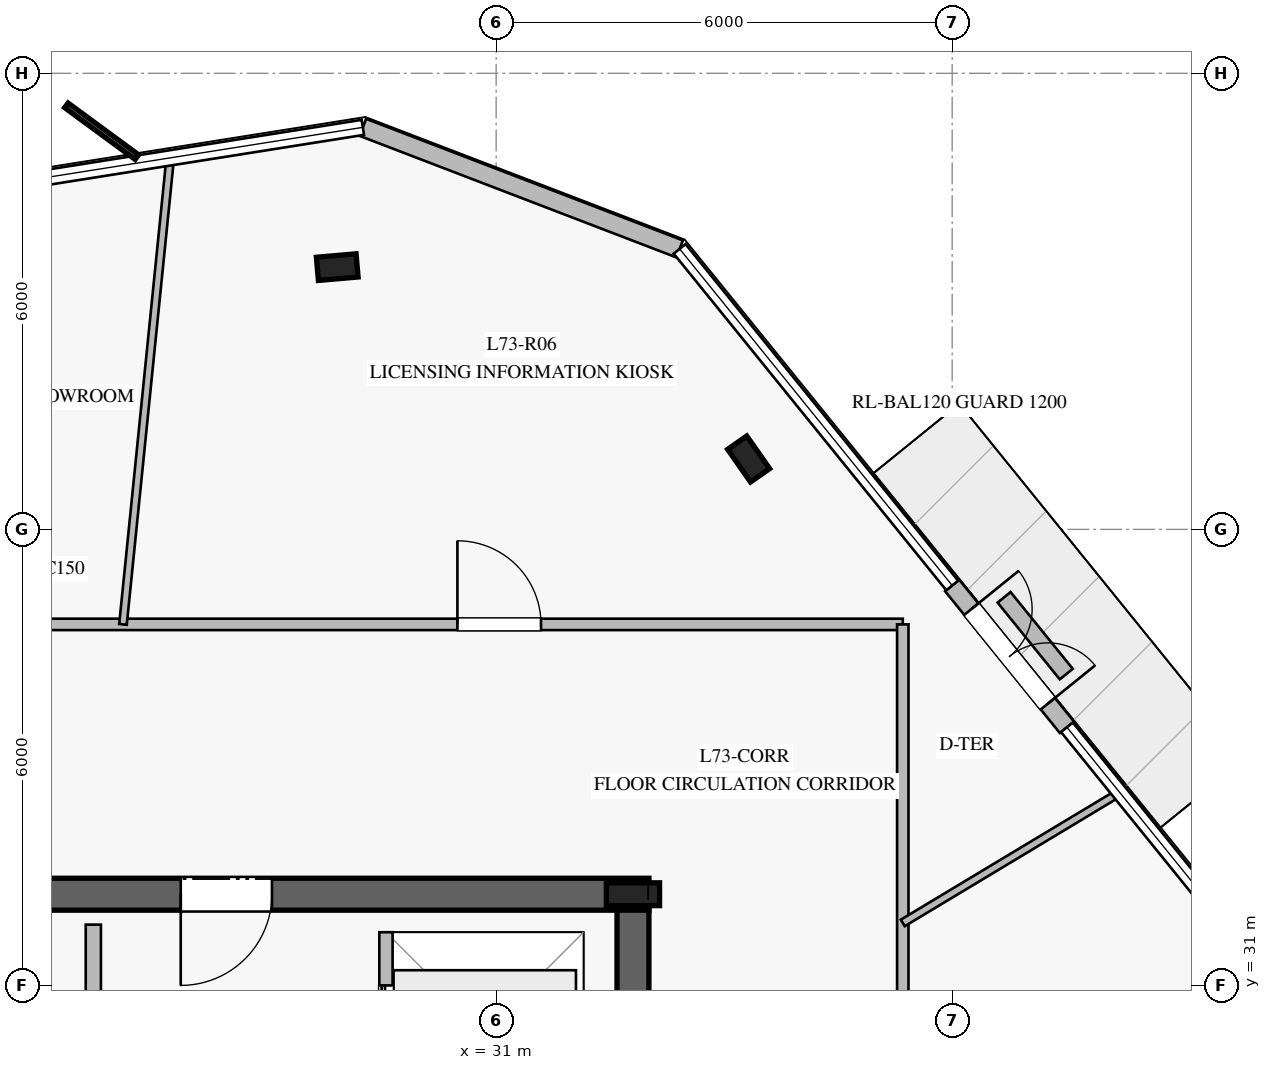
"""IFC4 building model, lengths in metres.
Left out: names, types, materials, properties, quantities, classifications, styles, units other than length and angle.
Written with IfcOpenShell. Run it as: python <this file> out.ifc"""

import sys

from ifc_helpers import new_model, si_unit, direction, frame, frame_2d, origin, origin_2d, place, context, subcontext, project, spatial, rectangle, i_section, extrude, element, fill, save


model = new_model("IFC4")
c1 = context("Model", 3, precision=1e-05, world=origin(), true_north=direction((0.0, 1.0)))
c2 = subcontext(c1, "Body", "Model", "MODEL_VIEW")
j1 = project(units=[si_unit("LENGTHUNIT", "METRE"), si_unit("PLANEANGLEUNIT", "RADIAN")], contexts=[c1])
p1 = place(None, origin())
s1 = spatial("IfcSite", under=j1, at=p1, CompositionType="ELEMENT")
p2 = place(p1, origin())
s2 = spatial("IfcBuilding", under=s1, at=p2, CompositionType="ELEMENT")
p3 = place(p2, frame((0.0, 0.0, 302.2)))
s3 = spatial("IfcBuildingStorey", under=s2, at=p3, CompositionType="ELEMENT", Elevation=302.2)
p4 = place(p3, frame((33.01, 32.2, 0.0), z_axis=(0.0, 0.0, 1.0), x_axis=(-1.0, 0.0, 0.0)))
e1 = element("IfcWall", 1, at=p4, inside=s3, PredefinedType="SHEAR", context=c2, shape_type="SweptSolid", body=[
    extrude(rectangle(XDim=16.02, YDim=0.42, at=frame_2d((8.01, 0.0))), origin(), (0.0, 0.0, 1.0), 3.78),
])
p5 = place(p4, frame((4.96, 0.0, 0.0)))
e2 = element("IfcOpeningElement", 2, at=p5, cuts=e1, PredefinedType="OPENING", context=c2, shape_type="SweptSolid", body=[
    extrude(rectangle(XDim=1.2, YDim=2.25, at=frame_2d((0.6, 1.125))), frame((0.0, 0.22, 0.0), z_axis=(0.0, -1.0, 0.0), x_axis=(1.0, 0.0, 0.0)), (0.0, 0.0, 1.0), 0.44),
])
p6 = place(p4, frame((9.785, 0.0, 0.0)))
e3 = element("IfcOpeningElement", 3, at=p6, cuts=e1, PredefinedType="OPENING", context=c2, shape_type="SweptSolid", body=[
    extrude(rectangle(XDim=1.1, YDim=2.2, at=frame_2d((0.55, 1.1))), frame((0.0, 0.22, 0.0), z_axis=(0.0, -1.0, 0.0), x_axis=(1.0, 0.0, 0.0)), (0.0, 0.0, 1.0), 0.44),
])
p7 = place(p3, frame((32.8, 18.01, 0.0), z_axis=(0.0, 0.0, 1.0), x_axis=(0.0, 1.0, 0.0)))
e4 = element("IfcWall", 4, at=p7, inside=s3, PredefinedType="SHEAR", context=c2, shape_type="SweptSolid", body=[
    extrude(rectangle(XDim=13.98, YDim=0.42, at=frame_2d((6.99, 0.0))), origin(), (0.0, 0.0, 1.0), 3.78),
])
p8 = place(p3, frame((32.8, 32.2, 0.0), z_axis=(0.0, 0.0, 1.0), x_axis=(1.0, 0.0, 0.0)))
e5 = element("IfcColumn", 5, at=p8, inside=s3, PredefinedType="COLUMN", context=c2, shape_type="SweptSolid", body=[
    extrude(i_section(OverallWidth=0.3, OverallDepth=0.7, WebThickness=0.017, FlangeThickness=0.032, at=origin_2d()), origin(), (0.0, 0.0, 1.0), 4.0),
])
for number, where, z_axis, x_axis in (
    (6, (28.909, 40.45, 0.0), (0.0, 0.0, 1.0), (0.996, 0.087, 0.0)),
    (7, (34.322, 37.926, 0.0), (0.0, 0.0, 1.0), (-0.574, 0.819, 0.0)),
):
    element("IfcColumn", number, at=place(p3, frame(where, z_axis=z_axis, x_axis=x_axis)), inside=s3, PredefinedType="COLUMN", context=c2, shape_type="SweptSolid", body=[
        extrude(i_section(OverallWidth=0.306, OverallDepth=0.524, WebThickness=0.021, FlangeThickness=0.04, at=origin_2d()), origin(), (0.0, 0.0, 1.0), 4.0),
    ])
p9 = place(p3, frame((38.51, 34.396, 0.0), z_axis=(0.0, 0.0, 1.0), x_axis=(-0.629063630367, 0.777353811948, 0.0)))
e8 = element("IfcWall", 8, at=p9, inside=s3, PredefinedType="STANDARD", context=c2, shape_type="SweptSolid", body=[
    extrude(rectangle(XDim=2.4, YDim=0.24, at=frame_2d((1.2, 0.0))), origin(), (0.0, 0.0, 1.0), 3.78),
])
p10 = place(p9, frame((0.4, 0.0, 0.0)))
e9 = element("IfcOpeningElement", 9, at=p10, cuts=e8, PredefinedType="OPENING", context=c2, shape_type="SweptSolid", body=[
    extrude(rectangle(XDim=1.6, YDim=2.25, at=frame_2d((0.8, 1.125))), frame((0.0, 0.13, 0.0), z_axis=(0.0, -1.0, 0.0), x_axis=(1.0, 0.0, 0.0)), (0.0, 0.0, 1.0), 0.26),
])
p11 = place(p3, frame((33.414, 40.69, 0.0), z_axis=(0.0, 0.0, 1.0), x_axis=(-0.933641283133, 0.358209372336, 0.0)))
e10 = element("IfcWall", 10, at=p11, inside=s3, PredefinedType="STANDARD", context=c2, shape_type="SweptSolid", body=[
    extrude(rectangle(XDim=4.464, YDim=0.24, at=frame_2d((2.232, 0.0))), origin(), (0.0, 0.0, 1.0), 3.78),
])
p12 = place(p3, frame((38.501, 35.096, 0.0), z_axis=(0.0, 0.0, 1.0), x_axis=(-0.629311706509, 0.777152993979, 0.0)))
e11 = element("IfcWall", 11, at=p12, inside=s3, PredefinedType="USERDEFINED", context=c2, shape_type="SweptSolid", body=[
    extrude(rectangle(XDim=1.3, YDim=0.22, at=frame_2d((0.65, 0.0))), origin(), (0.0, 0.0, 1.0), 0.4),
])
p13 = place(p3, frame((25.7, 26.65, 0.0), z_axis=(0.0, 0.0, 1.0), x_axis=(0.0, 1.0, 0.0)))
e12 = element("IfcWall", 12, at=p13, inside=s3, PredefinedType="PARTITIONING", context=c2, shape_type="SweptSolid", body=[
    extrude(rectangle(XDim=5.15, YDim=0.2, at=frame_2d((2.575, 0.0))), origin(), (0.0, 0.0, 1.0), 3.78),
])
p14 = place(p3, frame((29.55, 29.1, 0.0), z_axis=(0.0, 0.0, 1.0), x_axis=(0.0, 1.0, 0.0)))
e13 = element("IfcWall", 13, at=p14, inside=s3, PredefinedType="PARTITIONING", context=c2, shape_type="SweptSolid", body=[
    extrude(rectangle(XDim=2.6, YDim=0.175, at=frame_2d((1.3, 0.0))), origin(), (0.0, 0.0, 1.0), 3.78),
])
p15 = place(p14, frame((0.7, 0.0, 0.0)))
e14 = element("IfcOpeningElement", 14, at=p15, cuts=e13, PredefinedType="OPENING", context=c2, shape_type="SweptSolid", body=[
    extrude(rectangle(XDim=1.2, YDim=2.2, at=frame_2d((0.6, 1.1))), frame((0.0, 0.098, 0.0), z_axis=(0.0, -1.0, 0.0), x_axis=(1.0, 0.0, 0.0)), (0.0, 0.0, 1.0), 0.195),
])
p16 = place(p3, frame((13.65, 35.75, 0.0), z_axis=(0.0, 0.0, 1.0), x_axis=(1.0, 0.0, 0.0)))
e15 = element("IfcWall", 15, at=p16, inside=s3, PredefinedType="PARTITIONING", context=c2, shape_type="SweptSolid", body=[
    extrude(rectangle(XDim=22.7, YDim=0.15, at=frame_2d((11.35, 0.0))), origin(), (0.0, 0.0, 1.0), 3.28),
])
p17 = place(p16, frame((7.993, 0.0, 0.0)))
e16 = element("IfcOpeningElement", 16, at=p17, cuts=e15, PredefinedType="OPENING", context=c2, shape_type="SweptSolid", body=[
    extrude(rectangle(XDim=1.1, YDim=2.2, at=frame_2d((0.55, 1.1))), frame((0.0, 0.085, 0.0), z_axis=(0.0, -1.0, 0.0), x_axis=(1.0, 0.0, 0.0)), (0.0, 0.0, 1.0), 0.17),
])
p18 = place(p16, frame((16.84, 0.0, 0.0)))
e17 = element("IfcOpeningElement", 17, at=p18, cuts=e15, PredefinedType="OPENING", context=c2, shape_type="SweptSolid", body=[
    extrude(rectangle(XDim=1.1, YDim=2.2, at=frame_2d((0.55, 1.1))), frame((0.0, 0.085, 0.0), z_axis=(0.0, -1.0, 0.0), x_axis=(1.0, 0.0, 0.0)), (0.0, 0.0, 1.0), 0.17),
])
p19 = place(p16, frame((1.951, 0.0, 0.0)))
e18 = element("IfcOpeningElement", 18, at=p19, cuts=e15, PredefinedType="OPENING", context=c2, shape_type="SweptSolid", body=[
    extrude(rectangle(XDim=1.1, YDim=2.2, at=frame_2d((0.55, 1.1))), frame((0.0, 0.085, 0.0), z_axis=(0.0, -1.0, 0.0), x_axis=(1.0, 0.0, 0.0)), (0.0, 0.0, 1.0), 0.17),
])
p20 = place(p3, frame((36.35, 35.75, 0.0), z_axis=(0.0, 0.0, 1.0), x_axis=(0.0, -1.0, 0.0)))
e19 = element("IfcWall", 19, at=p20, inside=s3, PredefinedType="PARTITIONING", context=c2, shape_type="SweptSolid", body=[
    extrude(rectangle(XDim=21.5, YDim=0.15, at=frame_2d((10.75, 0.0))), origin(), (0.0, 0.0, 1.0), 3.05),
])
p21 = place(p20, frame((17.585, 0.0, 0.0)))
e20 = element("IfcOpeningElement", 20, at=p21, cuts=e19, PredefinedType="OPENING", context=c2, shape_type="SweptSolid", body=[
    extrude(rectangle(XDim=1.1, YDim=2.2, at=frame_2d((0.55, 1.1))), frame((0.0, 0.085, 0.0), z_axis=(0.0, -1.0, 0.0), x_axis=(1.0, 0.0, 0.0)), (0.0, 0.0, 1.0), 0.17),
])
p22 = place(p20, frame((8.868, 0.0, 0.0)))
e21 = element("IfcOpeningElement", 21, at=p22, cuts=e19, PredefinedType="OPENING", context=c2, shape_type="SweptSolid", body=[
    extrude(rectangle(XDim=1.1, YDim=2.2, at=frame_2d((0.55, 1.1))), frame((0.0, 0.085, 0.0), z_axis=(0.0, -1.0, 0.0), x_axis=(1.0, 0.0, 0.0)), (0.0, 0.0, 1.0), 0.17),
])
p23 = place(p3, frame((36.35, 31.822, 0.0), z_axis=(0.0, 0.0, 1.0), x_axis=(0.857024658814, 0.515275396448, 0.0)))
e22 = element("IfcWall", 22, at=p23, inside=s3, PredefinedType="MOVABLE", context=c2, shape_type="SweptSolid", body=[
    extrude(rectangle(XDim=3.315, YDim=0.1, at=frame_2d((1.657, 0.0))), origin(), (0.0, 0.0, 1.0), 3.28),
])
p24 = place(p3, frame((26.09, 35.75, 0.0), z_axis=(0.0, 0.0, 1.0), x_axis=(0.100753039723, 0.994911465904, 0.0)))
e23 = element("IfcWall", 23, at=p24, inside=s3, PredefinedType="MOVABLE", context=c2, shape_type="SweptSolid", body=[
    extrude(rectangle(XDim=6.152, YDim=0.1, at=frame_2d((3.076, 0.0))), origin(), (0.0, 0.0, 1.0), 3.28),
])
p25 = place(p10, frame((1.6, 0.0, 0.0), z_axis=(0.0, 0.0, 1.0), x_axis=(-1.0, 0.0, 0.0)))
e24 = element("IfcDoor", 24, at=p25, inside=s3, OperationType="DOUBLE_DOOR_SINGLE_SWING", PredefinedType="DOOR", context=c2, shape_type="SweptSolid", body=[
    extrude(rectangle(XDim=1.6, YDim=2.25, at=frame_2d((0.8, 1.125))), frame((0.0, 0.025, 0.0), z_axis=(0.0, -1.0, 0.0), x_axis=(1.0, 0.0, 0.0)), (0.0, 0.0, 1.0), 0.05),
])
fill(e9, e24)
p26 = place(p5, origin())
e25 = element("IfcDoor", 25, at=p26, inside=s3, OperationType="SINGLE_SWING_RIGHT", PredefinedType="DOOR", context=c2, shape_type="SweptSolid", body=[
    extrude(rectangle(XDim=1.2, YDim=2.25, at=frame_2d((0.6, 1.125))), frame((0.0, 0.025, 0.0), z_axis=(0.0, -1.0, 0.0), x_axis=(1.0, 0.0, 0.0)), (0.0, 0.0, 1.0), 0.05),
])
fill(e2, e25)
p27 = place(p15, origin())
e26 = element("IfcDoor", 26, at=p27, inside=s3, OperationType="DOUBLE_DOOR_SLIDING", PredefinedType="DOOR", context=c2, shape_type="SweptSolid", body=[
    extrude(rectangle(XDim=1.2, YDim=2.2, at=frame_2d((0.6, 1.1))), frame((0.0, 0.025, 0.0), z_axis=(0.0, -1.0, 0.0), x_axis=(1.0, 0.0, 0.0)), (0.0, 0.0, 1.0), 0.05),
])
fill(e14, e26)
p28 = place(p18, origin())
e27 = element("IfcDoor", 27, at=p28, inside=s3, OperationType="SINGLE_SWING_LEFT", PredefinedType="DOOR", context=c2, shape_type="SweptSolid", body=[
    extrude(rectangle(XDim=1.1, YDim=2.2, at=frame_2d((0.55, 1.1))), frame((0.0, 0.025, 0.0), z_axis=(0.0, -1.0, 0.0), x_axis=(1.0, 0.0, 0.0)), (0.0, 0.0, 1.0), 0.05),
])
fill(e17, e27)
save(model, sys.argv[1])
